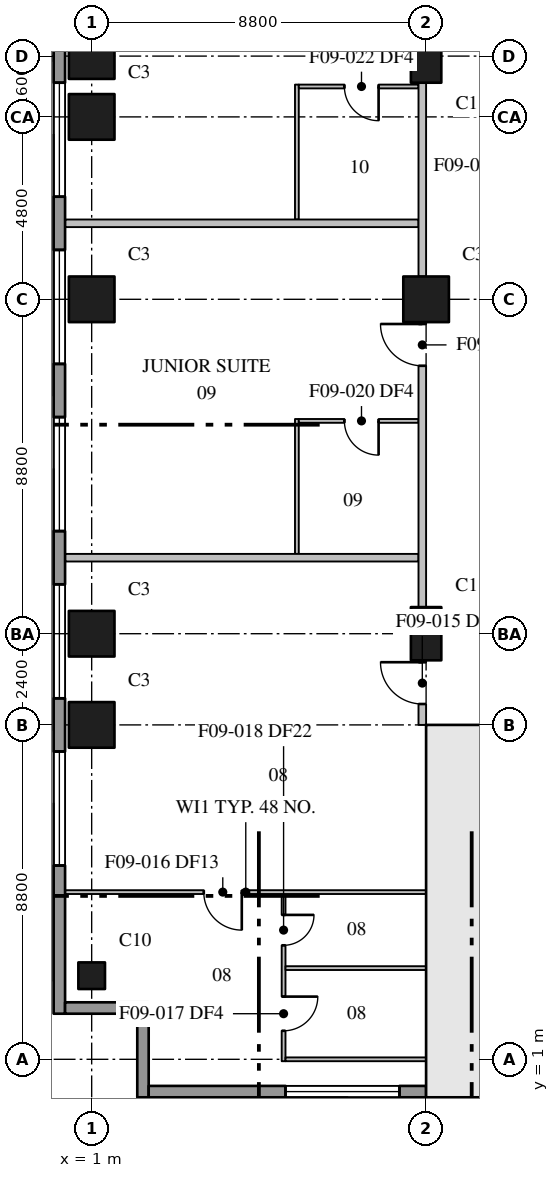
"""IFC4 building model, lengths in metres.
Left out: names, types, materials, properties, quantities, classifications, styles, units other than length and angle.
Written with IfcOpenShell. Run it as: python <this file> out.ifc"""

import sys

from ifc_helpers import new_model, si_unit, direction, frame, frame_2d, origin, origin_2d, place, context, subcontext, project, spatial, rectangle, extrude, element, fill, save


model = new_model("IFC4")
c1 = context("Model", 3, precision=1e-05, world=origin(), true_north=direction((0.0, 1.0)))
c2 = subcontext(c1, "Body", "Model", "MODEL_VIEW")
j1 = project(units=[si_unit("LENGTHUNIT", "METRE"), si_unit("PLANEANGLEUNIT", "RADIAN")], contexts=[c1])
p1 = place(None, origin())
s1 = spatial("IfcSite", under=j1, at=p1, CompositionType="ELEMENT")
p2 = place(p1, origin())
s2 = spatial("IfcBuilding", under=s1, at=p2, CompositionType="ELEMENT")
p3 = place(p2, frame((0.0, 0.0, 98.2)))
s3 = spatial("IfcBuildingStorey", under=s2, at=p3, CompositionType="ELEMENT", Elevation=98.2)
p4 = place(p3, frame((1.0, 3.2, 0.0), z_axis=(0.0, 0.0, 1.0), x_axis=(1.0, 0.0, 0.0)))
e1 = element("IfcColumn", 1, at=p4, inside=s3, PredefinedType="COLUMN", context=c2, shape_type="SweptSolid", body=[
    extrude(rectangle(XDim=0.7, YDim=0.7, at=origin_2d()), origin(), (0.0, 0.0, 1.0), 3.7),
])
for number, where, z_axis, x_axis in (
    (2, (1.0, 9.8, 0.0), (0.0, 0.0, 1.0), (1.0, 0.0, 0.0)),
    (3, (1.0, 12.2, 0.0), (0.0, 0.0, 1.0), (1.0, 0.0, 0.0)),
    (4, (1.0, 21.0, 0.0), (0.0, 0.0, 1.0), (1.0, 0.0, 0.0)),
    (5, (1.0, 25.8, 0.0), (0.0, 0.0, 1.0), (1.0, 0.0, 0.0)),
    (6, (1.0, 27.4, 0.0), (0.0, 0.0, 1.0), (1.0, 0.0, 0.0)),
):
    element("IfcColumn", number, at=place(p3, frame(where, z_axis=z_axis, x_axis=x_axis)), inside=s3, PredefinedType="COLUMN", context=c2, shape_type="SweptSolid", body=[
        extrude(rectangle(XDim=1.2, YDim=1.2, at=origin_2d()), origin(), (0.0, 0.0, 1.0), 3.7),
    ])
p5 = place(p3, frame((9.8, 12.2, 0.0), z_axis=(0.0, 0.0, 1.0), x_axis=(0.0, 1.0, 0.0)))
e7 = element("IfcColumn", 7, at=p5, inside=s3, PredefinedType="COLUMN", context=c2, shape_type="SweptSolid", body=[
    extrude(rectangle(XDim=1.4, YDim=0.8, at=origin_2d()), origin(), (0.0, 0.0, 1.0), 3.7),
])
p6 = place(p3, frame((9.8, 21.0, 0.0), z_axis=(0.0, 0.0, 1.0), x_axis=(1.0, 0.0, 0.0)))
e8 = element("IfcColumn", 8, at=p6, inside=s3, PredefinedType="COLUMN", context=c2, shape_type="SweptSolid", body=[
    extrude(rectangle(XDim=1.2, YDim=1.2, at=origin_2d()), origin(), (0.0, 0.0, 1.0), 3.7),
])
p7 = place(p3, frame((9.8, 27.4, 0.0), z_axis=(0.0, 0.0, 1.0), x_axis=(0.0, 1.0, 0.0)))
e9 = element("IfcColumn", 9, at=p7, inside=s3, PredefinedType="COLUMN", context=c2, shape_type="SweptSolid", body=[
    extrude(rectangle(XDim=1.4, YDim=0.8, at=origin_2d()), origin(), (0.0, 0.0, 1.0), 3.7),
])
p8 = place(p3, frame((9.8, 0.8, 0.0), z_axis=(0.0, 0.0, 1.0), x_axis=(1.0, 0.0, 0.0)))
e10 = element("IfcWall", 10, at=p8, inside=s3, PredefinedType="SHEAR", context=c2, shape_type="SweptSolid", body=[
    extrude(rectangle(XDim=35.2, YDim=0.8, at=frame_2d((17.6, 0.0))), origin(), (0.0, 0.0, 1.0), 3.7),
])
p9 = place(p3, frame((10.6, 1.2, 0.0), z_axis=(0.0, 0.0, 1.0), x_axis=(0.0, 1.0, 0.0)))
e11 = element("IfcWall", 11, at=p9, inside=s3, PredefinedType="SHEAR", context=c2, shape_type="SweptSolid", body=[
    extrude(rectangle(XDim=8.6, YDim=0.8, at=frame_2d((4.3, 0.0))), origin(), (0.0, 0.0, 1.0), 3.7),
])
p10 = place(p3, frame((9.8, 9.6, 0.0), z_axis=(0.0, 0.0, 1.0), x_axis=(1.0, 0.0, 0.0)))
e12 = element("IfcWall", 12, at=p10, inside=s3, PredefinedType="SHEAR", context=c2, shape_type="SweptSolid", body=[
    extrude(rectangle(XDim=4.3, YDim=0.4, at=frame_2d((2.15, 0.0))), origin(), (0.0, 0.0, 1.0), 3.7),
])
p11 = place(p10, frame((2.05, 0.0, 0.0)))
e13 = element("IfcOpeningElement", 13, at=p11, cuts=e12, PredefinedType="OPENING", context=c2, shape_type="SweptSolid", body=[
    extrude(rectangle(XDim=1.2, YDim=2.1, at=frame_2d((0.6, 1.05))), frame((0.0, 0.21, 0.0), z_axis=(0.0, -1.0, 0.0), x_axis=(1.0, 0.0, 0.0)), (0.0, 0.0, 1.0), 0.42),
])
p12 = place(p3, frame((0.15, 78.7, 0.0), z_axis=(0.0, 0.0, 1.0), x_axis=(0.0, -1.0, 0.0)))
e14 = element("IfcWall", 14, at=p12, inside=s3, PredefinedType="STANDARD", context=c2, shape_type="SweptSolid", body=[
    extrude(rectangle(XDim=76.5, YDim=0.3, at=frame_2d((38.25, 0.0))), origin(), (0.0, 0.0, 1.0), 3.3),
])
p13 = place(p12, frame((3.6, 0.0, 0.75)))
e15 = element("IfcOpeningElement", 15, at=p13, cuts=e14, PredefinedType="OPENING", context=c2, shape_type="SweptSolid", body=[
    extrude(rectangle(XDim=3.0, YDim=2.3, at=frame_2d((1.5, 1.15))), frame((0.0, 0.16, 0.0), z_axis=(0.0, -1.0, 0.0), x_axis=(1.0, 0.0, 0.0)), (0.0, 0.0, 1.0), 0.32),
])
p14 = place(p12, frame((8.0, 0.0, 0.75)))
e16 = element("IfcOpeningElement", 16, at=p14, cuts=e14, PredefinedType="OPENING", context=c2, shape_type="SweptSolid", body=[
    extrude(rectangle(XDim=3.0, YDim=2.3, at=frame_2d((1.5, 1.15))), frame((0.0, 0.16, 0.0), z_axis=(0.0, -1.0, 0.0), x_axis=(1.0, 0.0, 0.0)), (0.0, 0.0, 1.0), 0.32),
])
p15 = place(p12, frame((12.4, 0.0, 0.75)))
e17 = element("IfcOpeningElement", 17, at=p15, cuts=e14, PredefinedType="OPENING", context=c2, shape_type="SweptSolid", body=[
    extrude(rectangle(XDim=3.0, YDim=2.3, at=frame_2d((1.5, 1.15))), frame((0.0, 0.16, 0.0), z_axis=(0.0, -1.0, 0.0), x_axis=(1.0, 0.0, 0.0)), (0.0, 0.0, 1.0), 0.32),
])
p16 = place(p12, frame((16.8, 0.0, 0.75)))
e18 = element("IfcOpeningElement", 18, at=p16, cuts=e14, PredefinedType="OPENING", context=c2, shape_type="SweptSolid", body=[
    extrude(rectangle(XDim=3.0, YDim=2.3, at=frame_2d((1.5, 1.15))), frame((0.0, 0.16, 0.0), z_axis=(0.0, -1.0, 0.0), x_axis=(1.0, 0.0, 0.0)), (0.0, 0.0, 1.0), 0.32),
])
p17 = place(p12, frame((21.2, 0.0, 0.75)))
e19 = element("IfcOpeningElement", 19, at=p17, cuts=e14, PredefinedType="OPENING", context=c2, shape_type="SweptSolid", body=[
    extrude(rectangle(XDim=3.0, YDim=2.3, at=frame_2d((1.5, 1.15))), frame((0.0, 0.16, 0.0), z_axis=(0.0, -1.0, 0.0), x_axis=(1.0, 0.0, 0.0)), (0.0, 0.0, 1.0), 0.32),
])
p18 = place(p12, frame((25.6, 0.0, 0.75)))
e20 = element("IfcOpeningElement", 20, at=p18, cuts=e14, PredefinedType="OPENING", context=c2, shape_type="SweptSolid", body=[
    extrude(rectangle(XDim=3.0, YDim=2.3, at=frame_2d((1.5, 1.15))), frame((0.0, 0.16, 0.0), z_axis=(0.0, -1.0, 0.0), x_axis=(1.0, 0.0, 0.0)), (0.0, 0.0, 1.0), 0.32),
])
p19 = place(p12, frame((30.0, 0.0, 0.75)))
e21 = element("IfcOpeningElement", 21, at=p19, cuts=e14, PredefinedType="OPENING", context=c2, shape_type="SweptSolid", body=[
    extrude(rectangle(XDim=3.0, YDim=2.3, at=frame_2d((1.5, 1.15))), frame((0.0, 0.16, 0.0), z_axis=(0.0, -1.0, 0.0), x_axis=(1.0, 0.0, 0.0)), (0.0, 0.0, 1.0), 0.32),
])
p20 = place(p12, frame((34.4, 0.0, 0.75)))
e22 = element("IfcOpeningElement", 22, at=p20, cuts=e14, PredefinedType="OPENING", context=c2, shape_type="SweptSolid", body=[
    extrude(rectangle(XDim=3.0, YDim=2.3, at=frame_2d((1.5, 1.15))), frame((0.0, 0.16, 0.0), z_axis=(0.0, -1.0, 0.0), x_axis=(1.0, 0.0, 0.0)), (0.0, 0.0, 1.0), 0.32),
])
p21 = place(p12, frame((38.8, 0.0, 0.75)))
e23 = element("IfcOpeningElement", 23, at=p21, cuts=e14, PredefinedType="OPENING", context=c2, shape_type="SweptSolid", body=[
    extrude(rectangle(XDim=3.0, YDim=2.3, at=frame_2d((1.5, 1.15))), frame((0.0, 0.16, 0.0), z_axis=(0.0, -1.0, 0.0), x_axis=(1.0, 0.0, 0.0)), (0.0, 0.0, 1.0), 0.32),
])
p22 = place(p12, frame((43.2, 0.0, 0.75)))
e24 = element("IfcOpeningElement", 24, at=p22, cuts=e14, PredefinedType="OPENING", context=c2, shape_type="SweptSolid", body=[
    extrude(rectangle(XDim=3.0, YDim=2.3, at=frame_2d((1.5, 1.15))), frame((0.0, 0.16, 0.0), z_axis=(0.0, -1.0, 0.0), x_axis=(1.0, 0.0, 0.0)), (0.0, 0.0, 1.0), 0.32),
])
p23 = place(p12, frame((47.6, 0.0, 0.75)))
e25 = element("IfcOpeningElement", 25, at=p23, cuts=e14, PredefinedType="OPENING", context=c2, shape_type="SweptSolid", body=[
    extrude(rectangle(XDim=3.0, YDim=2.3, at=frame_2d((1.5, 1.15))), frame((0.0, 0.16, 0.0), z_axis=(0.0, -1.0, 0.0), x_axis=(1.0, 0.0, 0.0)), (0.0, 0.0, 1.0), 0.32),
])
p24 = place(p12, frame((52.0, 0.0, 0.75)))
e26 = element("IfcOpeningElement", 26, at=p24, cuts=e14, PredefinedType="OPENING", context=c2, shape_type="SweptSolid", body=[
    extrude(rectangle(XDim=3.0, YDim=2.3, at=frame_2d((1.5, 1.15))), frame((0.0, 0.16, 0.0), z_axis=(0.0, -1.0, 0.0), x_axis=(1.0, 0.0, 0.0)), (0.0, 0.0, 1.0), 0.32),
])
p25 = place(p12, frame((56.4, 0.0, 0.75)))
e27 = element("IfcOpeningElement", 27, at=p25, cuts=e14, PredefinedType="OPENING", context=c2, shape_type="SweptSolid", body=[
    extrude(rectangle(XDim=3.0, YDim=2.3, at=frame_2d((1.5, 1.15))), frame((0.0, 0.16, 0.0), z_axis=(0.0, -1.0, 0.0), x_axis=(1.0, 0.0, 0.0)), (0.0, 0.0, 1.0), 0.32),
])
p26 = place(p12, frame((60.8, 0.0, 0.75)))
e28 = element("IfcOpeningElement", 28, at=p26, cuts=e14, PredefinedType="OPENING", context=c2, shape_type="SweptSolid", body=[
    extrude(rectangle(XDim=3.0, YDim=2.3, at=frame_2d((1.5, 1.15))), frame((0.0, 0.16, 0.0), z_axis=(0.0, -1.0, 0.0), x_axis=(1.0, 0.0, 0.0)), (0.0, 0.0, 1.0), 0.32),
])
p27 = place(p12, frame((65.2, 0.0, 0.75)))
e29 = element("IfcOpeningElement", 29, at=p27, cuts=e14, PredefinedType="OPENING", context=c2, shape_type="SweptSolid", body=[
    extrude(rectangle(XDim=3.0, YDim=2.3, at=frame_2d((1.5, 1.15))), frame((0.0, 0.16, 0.0), z_axis=(0.0, -1.0, 0.0), x_axis=(1.0, 0.0, 0.0)), (0.0, 0.0, 1.0), 0.32),
])
p28 = place(p12, frame((69.6, 0.0, 0.75)))
e30 = element("IfcOpeningElement", 30, at=p28, cuts=e14, PredefinedType="OPENING", context=c2, shape_type="SweptSolid", body=[
    extrude(rectangle(XDim=3.0, YDim=2.3, at=frame_2d((1.5, 1.15))), frame((0.0, 0.16, 0.0), z_axis=(0.0, -1.0, 0.0), x_axis=(1.0, 0.0, 0.0)), (0.0, 0.0, 1.0), 0.32),
])
for number, where, z_axis, x_axis in (
    (31, (0.3, 2.35, 0.0), (0.0, 0.0, 1.0), (1.0, 0.0, 0.0)),
    (32, (2.35, 2.2, 0.0), (0.0, 0.0, 1.0), (0.0, -1.0, 0.0)),
):
    element("IfcWall", number, at=place(p3, frame(where, z_axis=z_axis, x_axis=x_axis)), inside=s3, PredefinedType="STANDARD", context=c2, shape_type="SweptSolid", body=[
        extrude(rectangle(XDim=2.2, YDim=0.3, at=frame_2d((1.1, 0.0))), origin(), (0.0, 0.0, 1.0), 3.3),
    ])
p29 = place(p3, frame((2.5, 0.15, 0.0), z_axis=(0.0, 0.0, 1.0), x_axis=(1.0, 0.0, 0.0)))
e33 = element("IfcWall", 33, at=p29, inside=s3, PredefinedType="STANDARD", context=c2, shape_type="SweptSolid", body=[
    extrude(rectangle(XDim=7.3, YDim=0.3, at=frame_2d((3.65, 0.0))), origin(), (0.0, 0.0, 1.0), 3.3),
])
p30 = place(p29, frame((3.6, 0.0, 0.75)))
e34 = element("IfcOpeningElement", 34, at=p30, cuts=e33, PredefinedType="OPENING", context=c2, shape_type="SweptSolid", body=[
    extrude(rectangle(XDim=3.0, YDim=2.3, at=frame_2d((1.5, 1.15))), frame((0.0, 0.16, 0.0), z_axis=(0.0, -1.0, 0.0), x_axis=(1.0, 0.0, 0.0)), (0.0, 0.0, 1.0), 0.32),
])
p31 = place(p3, frame((9.7, 9.8, 0.0), z_axis=(0.0, 0.0, 1.0), x_axis=(0.0, 1.0, 0.0)))
e35 = element("IfcWall", 35, at=p31, inside=s3, PredefinedType="PARTITIONING", context=c2, shape_type="SweptSolid", body=[
    extrude(rectangle(XDim=1.7, YDim=0.2, at=frame_2d((0.85, 0.0))), origin(), (0.0, 0.0, 1.0), 3.3),
])
p32 = place(p31, frame((0.55, 0.0, 0.0)))
e36 = element("IfcOpeningElement", 36, at=p32, cuts=e35, PredefinedType="OPENING", context=c2, shape_type="SweptSolid", body=[
    extrude(rectangle(XDim=1.1, YDim=2.1, at=frame_2d((0.55, 1.05))), frame((0.0, 0.11, 0.0), z_axis=(0.0, -1.0, 0.0), x_axis=(1.0, 0.0, 0.0)), (0.0, 0.0, 1.0), 0.22),
])
p33 = place(p3, frame((9.7, 12.9, 0.0), z_axis=(0.0, 0.0, 1.0), x_axis=(0.0, 1.0, 0.0)))
e37 = element("IfcWall", 37, at=p33, inside=s3, PredefinedType="PARTITIONING", context=c2, shape_type="SweptSolid", body=[
    extrude(rectangle(XDim=7.5, YDim=0.2, at=frame_2d((3.75, 0.0))), origin(), (0.0, 0.0, 1.0), 3.3),
])
p34 = place(p33, frame((6.35, 0.0, 0.0)))
e38 = element("IfcOpeningElement", 38, at=p34, cuts=e37, PredefinedType="OPENING", context=c2, shape_type="SweptSolid", body=[
    extrude(rectangle(XDim=1.1, YDim=2.1, at=frame_2d((0.55, 1.05))), frame((0.0, 0.11, 0.0), z_axis=(0.0, -1.0, 0.0), x_axis=(1.0, 0.0, 0.0)), (0.0, 0.0, 1.0), 0.22),
])
p35 = place(p3, frame((9.7, 21.6, 0.0), z_axis=(0.0, 0.0, 1.0), x_axis=(0.0, 1.0, 0.0)))
e39 = element("IfcWall", 39, at=p35, inside=s3, PredefinedType="PARTITIONING", context=c2, shape_type="SweptSolid", body=[
    extrude(rectangle(XDim=5.1, YDim=0.2, at=frame_2d((2.55, 0.0))), origin(), (0.0, 0.0, 1.0), 3.3),
])
for number, where, z_axis, x_axis in (
    (40, (0.31, 14.2, 0.0), (0.0, 0.0, 1.0), (1.0, 0.0, 0.0)),
    (41, (0.31, 23.0, 0.0), (0.0, 0.0, 1.0), (1.0, 0.0, 0.0)),
):
    element("IfcWall", number, at=place(p3, frame(where, z_axis=z_axis, x_axis=x_axis)), inside=s3, PredefinedType="PARTITIONING", context=c2, shape_type="SweptSolid", body=[
        extrude(rectangle(XDim=9.29, YDim=0.2, at=frame_2d((4.645, 0.0))), origin(), (0.0, 0.0, 1.0), 3.3),
    ])
p36 = place(p3, frame((6.05, 5.35, 0.0), z_axis=(0.0, 0.0, 1.0), x_axis=(0.0, -1.0, 0.0)))
e42 = element("IfcWall", 42, at=p36, inside=s3, PredefinedType="PARTITIONING", context=c2, shape_type="SweptSolid", body=[
    extrude(rectangle(XDim=4.4, YDim=0.1, at=frame_2d((2.2, 0.0))), origin(), (0.0, 0.0, 1.0), 3.3),
])
p37 = place(p36, frame((2.7, 0.0, 0.0)))
e43 = element("IfcOpeningElement", 43, at=p37, cuts=e42, PredefinedType="OPENING", context=c2, shape_type="SweptSolid", body=[
    extrude(rectangle(XDim=0.9, YDim=2.1, at=frame_2d((0.45, 1.05))), frame((0.0, 0.06, 0.0), z_axis=(0.0, -1.0, 0.0), x_axis=(1.0, 0.0, 0.0)), (0.0, 0.0, 1.0), 0.12),
])
p38 = place(p36, frame((0.55, 0.0, 0.0)))
e44 = element("IfcOpeningElement", 44, at=p38, cuts=e42, PredefinedType="OPENING", context=c2, shape_type="SweptSolid", body=[
    extrude(rectangle(XDim=0.8, YDim=2.1, at=frame_2d((0.4, 1.05))), frame((0.0, 0.06, 0.0), z_axis=(0.0, -1.0, 0.0), x_axis=(1.0, 0.0, 0.0)), (0.0, 0.0, 1.0), 0.12),
])
p39 = place(p3, frame((9.8, 5.4, 0.0), z_axis=(0.0, 0.0, 1.0), x_axis=(-1.0, 0.0, 0.0)))
e45 = element("IfcWall", 45, at=p39, inside=s3, PredefinedType="PARTITIONING", context=c2, shape_type="SweptSolid", body=[
    extrude(rectangle(XDim=9.49, YDim=0.1, at=frame_2d((4.745, 0.0))), origin(), (0.0, 0.0, 1.0), 3.3),
])
p40 = place(p39, frame((4.85, 0.0, 0.0)))
e46 = element("IfcOpeningElement", 46, at=p40, cuts=e45, PredefinedType="OPENING", context=c2, shape_type="SweptSolid", body=[
    extrude(rectangle(XDim=1.0, YDim=2.1, at=frame_2d((0.5, 1.05))), frame((0.0, 0.06, 0.0), z_axis=(0.0, -1.0, 0.0), x_axis=(1.0, 0.0, 0.0)), (0.0, 0.0, 1.0), 0.12),
])
for number, where, z_axis, x_axis in (
    (47, (6.1, 1.0, 0.0), (0.0, 0.0, 1.0), (1.0, 0.0, 0.0)),
    (48, (6.1, 3.4, 0.0), (0.0, 0.0, 1.0), (1.0, 0.0, 0.0)),
):
    element("IfcWall", number, at=place(p3, frame(where, z_axis=z_axis, x_axis=x_axis)), inside=s3, PredefinedType="PARTITIONING", context=c2, shape_type="SweptSolid", body=[
        extrude(rectangle(XDim=3.7, YDim=0.1, at=frame_2d((1.85, 0.0))), origin(), (0.0, 0.0, 1.0), 3.3),
    ])
p41 = place(p3, frame((6.4, 14.3, 0.0), z_axis=(0.0, 0.0, 1.0), x_axis=(0.0, 1.0, 0.0)))
e49 = element("IfcWall", 49, at=p41, inside=s3, PredefinedType="PARTITIONING", context=c2, shape_type="SweptSolid", body=[
    extrude(rectangle(XDim=3.55, YDim=0.1, at=frame_2d((1.775, 0.0))), origin(), (0.0, 0.0, 1.0), 3.3),
])
p42 = place(p3, frame((6.4, 23.1, 0.0), z_axis=(0.0, 0.0, 1.0), x_axis=(0.0, 1.0, 0.0)))
e50 = element("IfcWall", 50, at=p42, inside=s3, PredefinedType="PARTITIONING", context=c2, shape_type="SweptSolid", body=[
    extrude(rectangle(XDim=3.55, YDim=0.1, at=frame_2d((1.775, 0.0))), origin(), (0.0, 0.0, 1.0), 3.3),
])
p43 = place(p3, frame((9.6, 17.8, 0.0), z_axis=(0.0, 0.0, 1.0), x_axis=(-1.0, 0.0, 0.0)))
e51 = element("IfcWall", 51, at=p43, inside=s3, PredefinedType="PARTITIONING", context=c2, shape_type="SweptSolid", body=[
    extrude(rectangle(XDim=3.15, YDim=0.1, at=frame_2d((1.575, 0.0))), origin(), (0.0, 0.0, 1.0), 3.3),
])
p44 = place(p43, frame((1.05, 0.0, 0.0)))
e52 = element("IfcOpeningElement", 52, at=p44, cuts=e51, PredefinedType="OPENING", context=c2, shape_type="SweptSolid", body=[
    extrude(rectangle(XDim=0.9, YDim=2.1, at=frame_2d((0.45, 1.05))), frame((0.0, 0.06, 0.0), z_axis=(0.0, -1.0, 0.0), x_axis=(1.0, 0.0, 0.0)), (0.0, 0.0, 1.0), 0.12),
])
p45 = place(p3, frame((9.6, 26.6, 0.0), z_axis=(0.0, 0.0, 1.0), x_axis=(-1.0, 0.0, 0.0)))
e53 = element("IfcWall", 53, at=p45, inside=s3, PredefinedType="PARTITIONING", context=c2, shape_type="SweptSolid", body=[
    extrude(rectangle(XDim=3.15, YDim=0.1, at=frame_2d((1.575, 0.0))), origin(), (0.0, 0.0, 1.0), 3.3),
])
p46 = place(p45, frame((1.05, 0.0, 0.0)))
e54 = element("IfcOpeningElement", 54, at=p46, cuts=e53, PredefinedType="OPENING", context=c2, shape_type="SweptSolid", body=[
    extrude(rectangle(XDim=0.9, YDim=2.1, at=frame_2d((0.45, 1.05))), frame((0.0, 0.06, 0.0), z_axis=(0.0, -1.0, 0.0), x_axis=(1.0, 0.0, 0.0)), (0.0, 0.0, 1.0), 0.12),
])
p47 = place(p24, origin())
e55 = element("IfcWindow", 55, at=p47, inside=s3, PartitioningType="SINGLE_PANEL", PredefinedType="WINDOW", context=c2, shape_type="SweptSolid", body=[
    extrude(rectangle(XDim=3.0, YDim=2.3, at=frame_2d((1.5, 1.15))), frame((0.0, 0.03, 0.0), z_axis=(0.0, -1.0, 0.0), x_axis=(1.0, 0.0, 0.0)), (0.0, 0.0, 1.0), 0.06),
])
fill(e26, e55)
p48 = place(p25, origin())
e56 = element("IfcWindow", 56, at=p48, inside=s3, PartitioningType="SINGLE_PANEL", PredefinedType="WINDOW", context=c2, shape_type="SweptSolid", body=[
    extrude(rectangle(XDim=3.0, YDim=2.3, at=frame_2d((1.5, 1.15))), frame((0.0, 0.03, 0.0), z_axis=(0.0, -1.0, 0.0), x_axis=(1.0, 0.0, 0.0)), (0.0, 0.0, 1.0), 0.06),
])
fill(e27, e56)
p49 = place(p26, origin())
e57 = element("IfcWindow", 57, at=p49, inside=s3, PartitioningType="SINGLE_PANEL", PredefinedType="WINDOW", context=c2, shape_type="SweptSolid", body=[
    extrude(rectangle(XDim=3.0, YDim=2.3, at=frame_2d((1.5, 1.15))), frame((0.0, 0.03, 0.0), z_axis=(0.0, -1.0, 0.0), x_axis=(1.0, 0.0, 0.0)), (0.0, 0.0, 1.0), 0.06),
])
fill(e28, e57)
p50 = place(p27, origin())
e58 = element("IfcWindow", 58, at=p50, inside=s3, PartitioningType="SINGLE_PANEL", PredefinedType="WINDOW", context=c2, shape_type="SweptSolid", body=[
    extrude(rectangle(XDim=3.0, YDim=2.3, at=frame_2d((1.5, 1.15))), frame((0.0, 0.03, 0.0), z_axis=(0.0, -1.0, 0.0), x_axis=(1.0, 0.0, 0.0)), (0.0, 0.0, 1.0), 0.06),
])
fill(e29, e58)
p51 = place(p28, origin())
e59 = element("IfcWindow", 59, at=p51, inside=s3, PartitioningType="SINGLE_PANEL", PredefinedType="WINDOW", context=c2, shape_type="SweptSolid", body=[
    extrude(rectangle(XDim=3.0, YDim=2.3, at=frame_2d((1.5, 1.15))), frame((0.0, 0.03, 0.0), z_axis=(0.0, -1.0, 0.0), x_axis=(1.0, 0.0, 0.0)), (0.0, 0.0, 1.0), 0.06),
])
fill(e30, e59)
p52 = place(p30, origin())
e60 = element("IfcWindow", 60, at=p52, inside=s3, PartitioningType="SINGLE_PANEL", PredefinedType="WINDOW", context=c2, shape_type="SweptSolid", body=[
    extrude(rectangle(XDim=3.0, YDim=2.3, at=frame_2d((1.5, 1.15))), frame((0.0, 0.03, 0.0), z_axis=(0.0, -1.0, 0.0), x_axis=(1.0, 0.0, 0.0)), (0.0, 0.0, 1.0), 0.06),
])
fill(e34, e60)
p53 = place(p32, origin())
e61 = element("IfcDoor", 61, at=p53, inside=s3, OperationType="SINGLE_SWING_RIGHT", PredefinedType="DOOR", context=c2, shape_type="SweptSolid", body=[
    extrude(rectangle(XDim=1.1, YDim=2.1, at=frame_2d((0.55, 1.05))), frame((0.0, 0.025, 0.0), z_axis=(0.0, -1.0, 0.0), x_axis=(1.0, 0.0, 0.0)), (0.0, 0.0, 1.0), 0.05),
])
fill(e36, e61)
p54 = place(p40, origin())
e62 = element("IfcDoor", 62, at=p54, inside=s3, OperationType="SINGLE_SWING_LEFT", PredefinedType="DOOR", context=c2, shape_type="SweptSolid", body=[
    extrude(rectangle(XDim=1.0, YDim=2.1, at=frame_2d((0.5, 1.05))), frame((0.0, 0.025, 0.0), z_axis=(0.0, -1.0, 0.0), x_axis=(1.0, 0.0, 0.0)), (0.0, 0.0, 1.0), 0.05),
])
fill(e46, e62)
p55 = place(p37, origin())
e63 = element("IfcDoor", 63, at=p55, inside=s3, OperationType="SINGLE_SWING_LEFT", PredefinedType="DOOR", context=c2, shape_type="SweptSolid", body=[
    extrude(rectangle(XDim=0.9, YDim=2.1, at=frame_2d((0.45, 1.05))), frame((0.0, 0.025, 0.0), z_axis=(0.0, -1.0, 0.0), x_axis=(1.0, 0.0, 0.0)), (0.0, 0.0, 1.0), 0.05),
])
fill(e43, e63)
p56 = place(p38, origin())
e64 = element("IfcDoor", 64, at=p56, inside=s3, OperationType="SINGLE_SWING_LEFT", PredefinedType="DOOR", context=c2, shape_type="SweptSolid", body=[
    extrude(rectangle(XDim=0.8, YDim=2.1, at=frame_2d((0.4, 1.05))), frame((0.0, 0.025, 0.0), z_axis=(0.0, -1.0, 0.0), x_axis=(1.0, 0.0, 0.0)), (0.0, 0.0, 1.0), 0.05),
])
fill(e44, e64)
p57 = place(p34, origin())
e65 = element("IfcDoor", 65, at=p57, inside=s3, OperationType="SINGLE_SWING_RIGHT", PredefinedType="DOOR", context=c2, shape_type="SweptSolid", body=[
    extrude(rectangle(XDim=1.1, YDim=2.1, at=frame_2d((0.55, 1.05))), frame((0.0, 0.025, 0.0), z_axis=(0.0, -1.0, 0.0), x_axis=(1.0, 0.0, 0.0)), (0.0, 0.0, 1.0), 0.05),
])
fill(e38, e65)
p58 = place(p44, origin())
e66 = element("IfcDoor", 66, at=p58, inside=s3, OperationType="SINGLE_SWING_LEFT", PredefinedType="DOOR", context=c2, shape_type="SweptSolid", body=[
    extrude(rectangle(XDim=0.9, YDim=2.1, at=frame_2d((0.45, 1.05))), frame((0.0, 0.025, 0.0), z_axis=(0.0, -1.0, 0.0), x_axis=(1.0, 0.0, 0.0)), (0.0, 0.0, 1.0), 0.05),
])
fill(e52, e66)
p59 = place(p46, origin())
e67 = element("IfcDoor", 67, at=p59, inside=s3, OperationType="SINGLE_SWING_LEFT", PredefinedType="DOOR", context=c2, shape_type="SweptSolid", body=[
    extrude(rectangle(XDim=0.9, YDim=2.1, at=frame_2d((0.45, 1.05))), frame((0.0, 0.025, 0.0), z_axis=(0.0, -1.0, 0.0), x_axis=(1.0, 0.0, 0.0)), (0.0, 0.0, 1.0), 0.05),
])
fill(e54, e67)
save(model, sys.argv[1])
